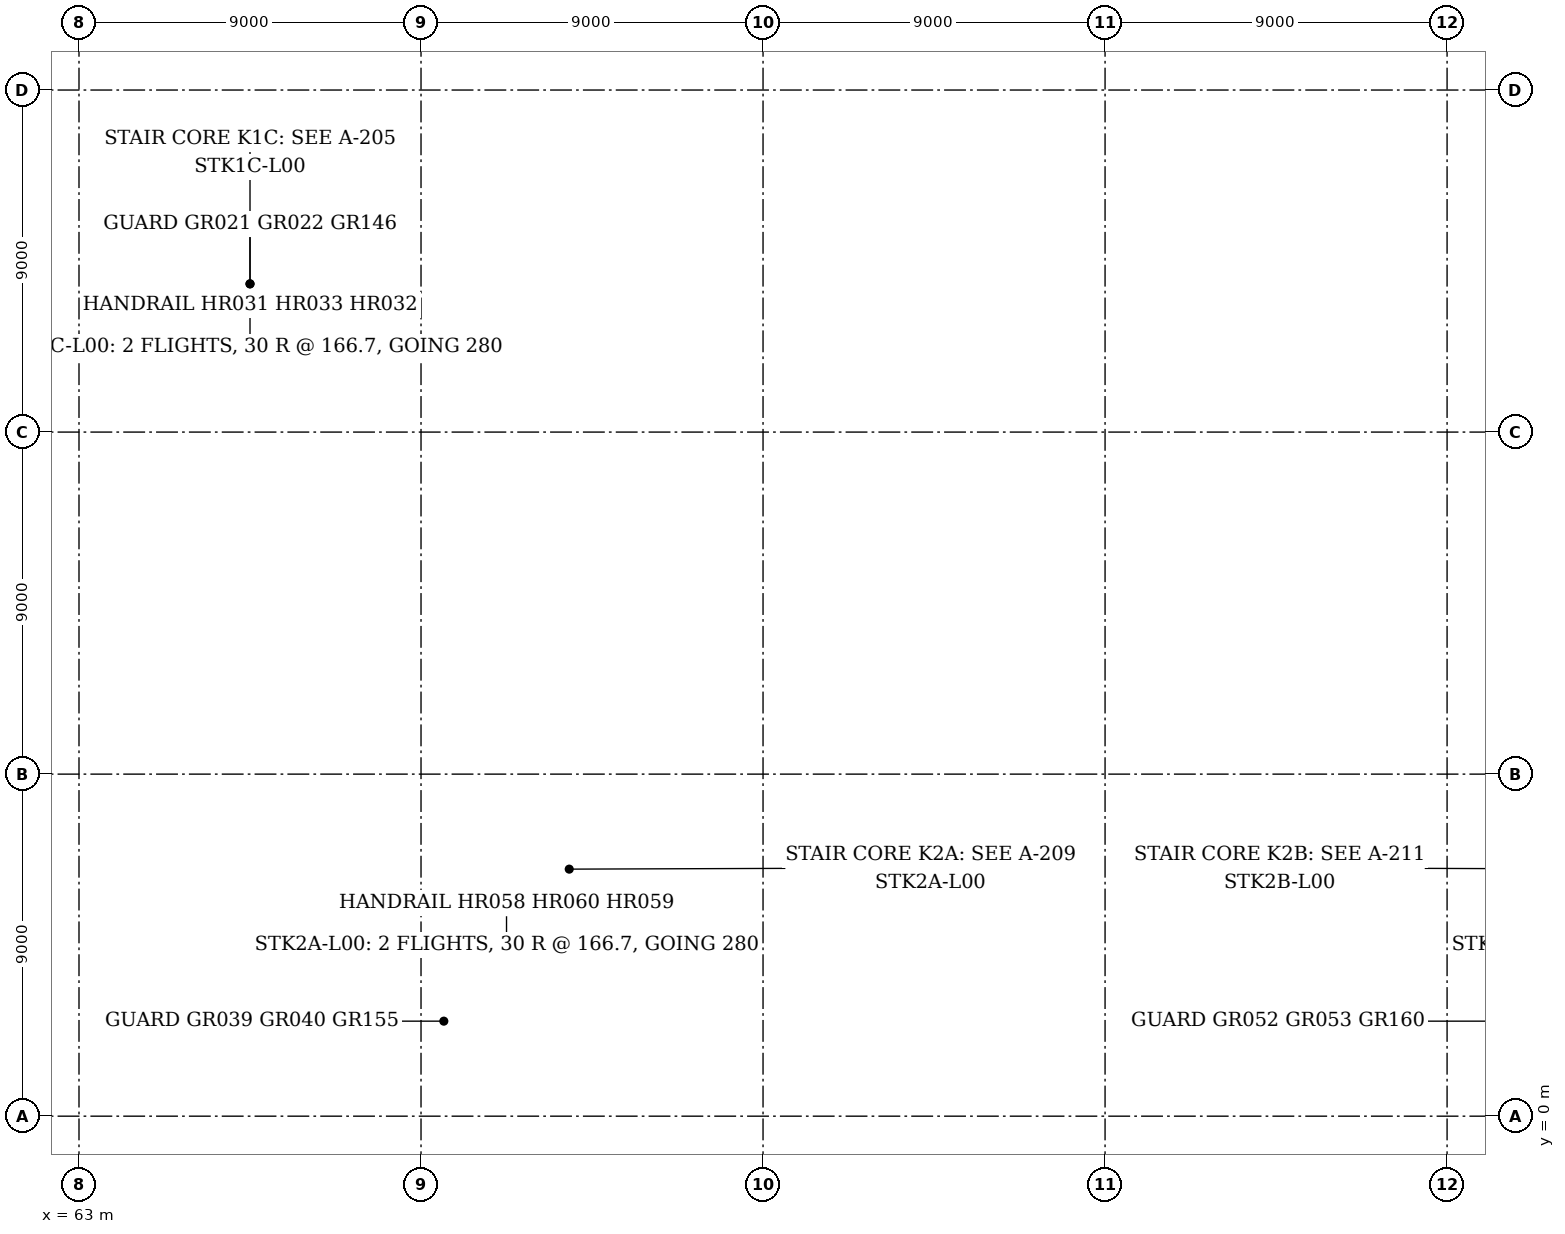
"""IFC4 building model, lengths in metres.
Left out: names, types, materials, properties, quantities, classifications, styles, units other than length and angle.
Written with IfcOpenShell. Run it as: python <this file> out.ifc"""

import sys

from ifc_helpers import new_model, si_unit, direction, frame, frame_2d, origin, origin_2d, place, context, subcontext, project, spatial, rectangle, hollow_rectangle, hollow_circle, i_section, extrude, element, fill, save


model = new_model("IFC4")
c1 = context("Model", 3, precision=1e-05, world=origin(), true_north=direction((0.0, 1.0)))
c2 = subcontext(c1, "Body", "Model", "MODEL_VIEW")
j1 = project(units=[si_unit("LENGTHUNIT", "METRE"), si_unit("PLANEANGLEUNIT", "RADIAN")], contexts=[c1])
p1 = place(None, origin())
s1 = spatial("IfcSite", under=j1, at=p1, CompositionType="ELEMENT")
p2 = place(p1, origin())
s2 = spatial("IfcBuilding", under=s1, at=p2, CompositionType="ELEMENT")
p3 = place(p2, origin())
s3 = spatial("IfcBuildingStorey", under=s2, at=p3, CompositionType="ELEMENT", Elevation=0.0)
p4 = place(p3, frame((81.0, 0.0, 0.0), z_axis=(0.0, 0.0, 1.0), x_axis=(1.0, 0.0, 0.0)))
e1 = element("IfcColumn", 1, at=p4, inside=s3, PredefinedType="COLUMN", context=c2, shape_type="SweptSolid", body=[
    extrude(hollow_rectangle(XDim=0.35, YDim=0.35, WallThickness=0.016, InnerFilletRadius=0.024, OuterFilletRadius=0.04, at=origin_2d()), origin(), (0.0, 0.0, 1.0), 5.0),
])
p5 = place(p3, frame((90.0, 0.0, 0.0), z_axis=(0.0, 0.0, 1.0), x_axis=(1.0, 0.0, 0.0)))
e2 = element("IfcColumn", 2, at=p5, inside=s3, PredefinedType="COLUMN", context=c2, shape_type="SweptSolid", body=[
    extrude(hollow_rectangle(XDim=0.3, YDim=0.3, WallThickness=0.016, InnerFilletRadius=0.024, OuterFilletRadius=0.04, at=origin_2d()), origin(), (0.0, 0.0, 1.0), 5.0),
])
p6 = place(p3, frame((99.0, 0.0, 0.0), z_axis=(0.0, 0.0, 1.0), x_axis=(1.0, 0.0, 0.0)))
e3 = element("IfcColumn", 3, at=p6, inside=s3, PredefinedType="COLUMN", context=c2, shape_type="SweptSolid", body=[
    extrude(hollow_rectangle(XDim=0.35, YDim=0.35, WallThickness=0.016, InnerFilletRadius=0.024, OuterFilletRadius=0.04, at=origin_2d()), origin(), (0.0, 0.0, 1.0), 5.0),
])
for number, where, z_axis, x_axis in (
    (4, (81.0, 9.0, 0.0), (0.0, 0.0, 1.0), (1.0, 0.0, 0.0)),
    (5, (90.0, 9.0, 0.0), (0.0, 0.0, 1.0), (1.0, 0.0, 0.0)),
    (6, (99.0, 9.0, 0.0), (0.0, 0.0, 1.0), (1.0, 0.0, 0.0)),
    (7, (81.0, 18.0, 0.0), (0.0, 0.0, 1.0), (1.0, 0.0, 0.0)),
    (8, (99.0, 18.0, 0.0), (0.0, 0.0, 1.0), (1.0, 0.0, 0.0)),
):
    element("IfcColumn", number, at=place(p3, frame(where, z_axis=z_axis, x_axis=x_axis)), inside=s3, PredefinedType="COLUMN", context=c2, shape_type="SweptSolid", body=[
        extrude(hollow_circle(Radius=0.203, WallThickness=0.013, at=origin_2d()), origin(), (0.0, 0.0, 1.0), 5.0),
    ])
p7 = place(p3, frame((63.0, 27.0, 0.0), z_axis=(0.0, 0.0, 1.0), x_axis=(1.0, 0.0, 0.0)))
e9 = element("IfcColumn", 9, at=p7, inside=s3, PredefinedType="COLUMN", context=c2, shape_type="SweptSolid", body=[
    extrude(i_section(OverallWidth=0.311, OverallDepth=0.327, WebThickness=0.016, FlangeThickness=0.025, FilletRadius=0.017, at=origin_2d()), origin(), (0.0, 0.0, 1.0), 5.0),
])
for number, where, z_axis, x_axis in (
    (10, (81.0, 27.0, 0.0), (0.0, 0.0, 1.0), (1.0, 0.0, 0.0)),
    (11, (90.0, 27.0, 0.0), (0.0, 0.0, 1.0), (1.0, 0.0, 0.0)),
    (12, (99.0, 27.0, 0.0), (0.0, 0.0, 1.0), (1.0, 0.0, 0.0)),
):
    element("IfcColumn", number, at=place(p3, frame(where, z_axis=z_axis, x_axis=x_axis)), inside=s3, PredefinedType="COLUMN", context=c2, shape_type="SweptSolid", body=[
        extrude(hollow_circle(Radius=0.203, WallThickness=0.013, at=origin_2d()), origin(), (0.0, 0.0, 1.0), 5.0),
    ])
p8 = place(p3, frame((67.5, 13.5, -0.2), z_axis=(0.0, 0.0, 1.0), x_axis=(1.0, 0.0, 0.0)))
e13 = element("IfcColumn", 13, at=p8, inside=s3, PredefinedType="COLUMN", context=c2, shape_type="SweptSolid", body=[
    extrude(hollow_circle(Radius=0.11, WallThickness=0.008, at=origin_2d()), origin(), (0.0, 0.0, 1.0), 4.743),
])
p9 = place(p3, frame((72.1, 9.0, 0.0), z_axis=(0.0, 0.0, 1.0), x_axis=(0.0, 1.0, 0.0)))
e14 = element("IfcWall", 14, at=p9, inside=s3, PredefinedType="SOLIDWALL", context=c2, shape_type="SweptSolid", body=[
    extrude(rectangle(XDim=9.0, YDim=0.32, at=frame_2d((4.5, 0.0))), origin(), (0.0, 0.0, 1.0), 4.835),
])
p10 = place(p3, frame((82.663, 0.15, 0.0), z_axis=(0.0, 0.0, 1.0), x_axis=(1.0, 0.0, 0.0)))
e15 = element("IfcWall", 15, at=p10, inside=s3, PredefinedType="SOLIDWALL", context=c2, shape_type="SweptSolid", body=[
    extrude(rectangle(XDim=5.7, YDim=0.2, at=frame_2d((2.85, 0.0))), origin(), (0.0, 0.0, 1.0), 4.835),
])
p11 = place(p10, frame((0.3, 0.0, 0.0)))
e16 = element("IfcOpeningElement", 16, at=p11, cuts=e15, PredefinedType="OPENING", context=c2, shape_type="SweptSolid", body=[
    extrude(rectangle(XDim=2.4, YDim=2.4, at=frame_2d((1.2, 1.2))), frame((0.0, 0.11, 0.0), z_axis=(0.0, -1.0, 0.0), x_axis=(1.0, 0.0, 0.0)), (0.0, 0.0, 1.0), 0.22),
])
p12 = place(p10, frame((3.0, 0.0, 0.0)))
e17 = element("IfcOpeningElement", 17, at=p12, cuts=e15, PredefinedType="OPENING", context=c2, shape_type="SweptSolid", body=[
    extrude(rectangle(XDim=2.4, YDim=2.4, at=frame_2d((1.2, 1.2))), frame((0.0, 0.11, 0.0), z_axis=(0.0, -1.0, 0.0), x_axis=(1.0, 0.0, 0.0)), (0.0, 0.0, 1.0), 0.22),
])
p13 = place(p3, frame((63.0, 18.15, 0.0), z_axis=(0.0, 0.0, 1.0), x_axis=(1.0, 0.0, 0.0)))
e18 = element("IfcWall", 18, at=p13, inside=s3, PredefinedType="SOLIDWALL", context=c2, shape_type="SweptSolid", body=[
    extrude(rectangle(XDim=9.0, YDim=0.3, at=frame_2d((4.5, 0.0))), origin(), (0.0, 0.0, 1.0), 5.0),
])
p14 = place(p13, frame((3.65, 0.0, 0.0)))
e19 = element("IfcOpeningElement", 19, at=p14, cuts=e18, PredefinedType="OPENING", context=c2, shape_type="SweptSolid", body=[
    extrude(rectangle(XDim=1.8, YDim=2.1, at=frame_2d((0.9, 1.05))), frame((0.0, 0.16, 0.0), z_axis=(0.0, -1.0, 0.0), x_axis=(1.0, 0.0, 0.0)), (0.0, 0.0, 1.0), 0.32),
])
p15 = place(p3, frame((71.85, 18.3, 0.0), z_axis=(0.0, 0.0, 1.0), x_axis=(0.0, 1.0, 0.0)))
e20 = element("IfcWall", 20, at=p15, inside=s3, PredefinedType="SOLIDWALL", context=c2, shape_type="SweptSolid", body=[
    extrude(rectangle(XDim=3.9, YDim=0.3, at=frame_2d((1.95, 0.0))), origin(), (0.0, 0.0, 1.0), 5.0),
])
p16 = place(p3, frame((63.0, 22.35, 0.0), z_axis=(0.0, 0.0, 1.0), x_axis=(1.0, 0.0, 0.0)))
e21 = element("IfcWall", 21, at=p16, inside=s3, PredefinedType="SOLIDWALL", context=c2, shape_type="SweptSolid", body=[
    extrude(rectangle(XDim=9.0, YDim=0.3, at=frame_2d((4.5, 0.0))), origin(), (0.0, 0.0, 1.0), 5.0),
])
p17 = place(p3, frame((63.15, 18.3, 0.0), z_axis=(0.0, 0.0, 1.0), x_axis=(0.0, 1.0, 0.0)))
e22 = element("IfcWall", 22, at=p17, inside=s3, PredefinedType="SOLIDWALL", context=c2, shape_type="SweptSolid", body=[
    extrude(rectangle(XDim=3.9, YDim=0.3, at=frame_2d((1.95, 0.0))), origin(), (0.0, 0.0, 1.0), 5.0),
])
p18 = place(p17, frame((1.05, 0.0, 0.0)))
e23 = element("IfcOpeningElement", 23, at=p18, cuts=e22, PredefinedType="OPENING", context=c2, shape_type="SweptSolid", body=[
    extrude(rectangle(XDim=1.8, YDim=2.1, at=frame_2d((0.9, 1.05))), frame((0.0, 0.16, 0.0), z_axis=(0.0, -1.0, 0.0), x_axis=(1.0, 0.0, 0.0)), (0.0, 0.0, 1.0), 0.32),
])
p19 = place(p3, frame((72.0, 0.15, 0.0), z_axis=(0.0, 0.0, 1.0), x_axis=(1.0, 0.0, 0.0)))
e24 = element("IfcWall", 24, at=p19, inside=s3, PredefinedType="SOLIDWALL", context=c2, shape_type="SweptSolid", body=[
    extrude(rectangle(XDim=4.5, YDim=0.3, at=frame_2d((2.25, 0.0))), origin(), (0.0, 0.0, 1.0), 5.0),
])
p20 = place(p19, frame((1.35, 0.0, 0.0)))
e25 = element("IfcOpeningElement", 25, at=p20, cuts=e24, PredefinedType="OPENING", context=c2, shape_type="SweptSolid", body=[
    extrude(rectangle(XDim=1.8, YDim=2.1, at=frame_2d((0.9, 1.05))), frame((0.0, 0.16, 0.0), z_axis=(0.0, -1.0, 0.0), x_axis=(1.0, 0.0, 0.0)), (0.0, 0.0, 1.0), 0.32),
])
p21 = place(p3, frame((76.35, 0.3, 0.0), z_axis=(0.0, 0.0, 1.0), x_axis=(0.0, 1.0, 0.0)))
e26 = element("IfcWall", 26, at=p21, inside=s3, PredefinedType="SOLIDWALL", context=c2, shape_type="SweptSolid", body=[
    extrude(rectangle(XDim=8.4, YDim=0.3, at=frame_2d((4.2, 0.0))), origin(), (0.0, 0.0, 1.0), 5.0),
])
p22 = place(p21, frame((0.25, 0.0, 0.0)))
e27 = element("IfcOpeningElement", 27, at=p22, cuts=e26, PredefinedType="OPENING", context=c2, shape_type="SweptSolid", body=[
    extrude(rectangle(XDim=1.2, YDim=2.1, at=frame_2d((0.6, 1.05))), frame((0.0, 0.16, 0.0), z_axis=(0.0, -1.0, 0.0), x_axis=(1.0, 0.0, 0.0)), (0.0, 0.0, 1.0), 0.32),
])
p23 = place(p3, frame((72.0, 8.85, 0.0), z_axis=(0.0, 0.0, 1.0), x_axis=(1.0, 0.0, 0.0)))
e28 = element("IfcWall", 28, at=p23, inside=s3, PredefinedType="SOLIDWALL", context=c2, shape_type="SweptSolid", body=[
    extrude(rectangle(XDim=4.5, YDim=0.3, at=frame_2d((2.25, 0.0))), origin(), (0.0, 0.0, 1.0), 5.0),
])
p24 = place(p3, frame((72.15, 0.3, 0.0), z_axis=(0.0, 0.0, 1.0), x_axis=(0.0, 1.0, 0.0)))
e29 = element("IfcWall", 29, at=p24, inside=s3, PredefinedType="SOLIDWALL", context=c2, shape_type="SweptSolid", body=[
    extrude(rectangle(XDim=8.4, YDim=0.3, at=frame_2d((4.2, 0.0))), origin(), (0.0, 0.0, 1.0), 5.0),
])
p25 = place(p3, frame((72.0, 27.15, 0.0), z_axis=(0.0, 0.0, 1.0), x_axis=(1.0, 0.0, 0.0)))
e30 = element("IfcWall", 30, at=p25, inside=s3, PredefinedType="SOLIDWALL", context=c2, shape_type="SweptSolid", body=[
    extrude(rectangle(XDim=4.5, YDim=0.3, at=frame_2d((2.25, 0.0))), origin(), (0.0, 0.0, 1.0), 5.0),
])
p26 = place(p3, frame((76.35, 27.3, 0.0), z_axis=(0.0, 0.0, 1.0), x_axis=(0.0, 1.0, 0.0)))
e31 = element("IfcWall", 31, at=p26, inside=s3, PredefinedType="SOLIDWALL", context=c2, shape_type="SweptSolid", body=[
    extrude(rectangle(XDim=8.4, YDim=0.3, at=frame_2d((4.2, 0.0))), origin(), (0.0, 0.0, 1.0), 5.0),
])
p27 = place(p26, frame((0.45, 0.0, 0.0)))
e32 = element("IfcOpeningElement", 32, at=p27, cuts=e31, PredefinedType="OPENING", context=c2, shape_type="SweptSolid", body=[
    extrude(rectangle(XDim=1.4, YDim=2.1, at=frame_2d((0.7, 1.05))), frame((0.0, 0.16, 0.0), z_axis=(0.0, -1.0, 0.0), x_axis=(1.0, 0.0, 0.0)), (0.0, 0.0, 1.0), 0.32),
])
p28 = place(p26, frame((4.925, 0.0, 0.0)))
e33 = element("IfcOpeningElement", 33, at=p28, cuts=e31, PredefinedType="OPENING", context=c2, shape_type="SweptSolid", body=[
    extrude(rectangle(XDim=1.0, YDim=2.1, at=frame_2d((0.5, 1.05))), frame((0.0, 0.16, 0.0), z_axis=(0.0, -1.0, 0.0), x_axis=(1.0, 0.0, 0.0)), (0.0, 0.0, 1.0), 0.32),
])
p29 = place(p3, frame((72.15, 27.3, 0.0), z_axis=(0.0, 0.0, 1.0), x_axis=(0.0, 1.0, 0.0)))
e34 = element("IfcWall", 34, at=p29, inside=s3, PredefinedType="SOLIDWALL", context=c2, shape_type="SweptSolid", body=[
    extrude(rectangle(XDim=8.4, YDim=0.3, at=frame_2d((4.2, 0.0))), origin(), (0.0, 0.0, 1.0), 5.0),
])
p30 = place(p29, frame((0.45, 0.0, 0.0)))
e35 = element("IfcOpeningElement", 35, at=p30, cuts=e34, PredefinedType="OPENING", context=c2, shape_type="SweptSolid", body=[
    extrude(rectangle(XDim=1.4, YDim=2.1, at=frame_2d((0.7, 1.05))), frame((0.0, 0.16, 0.0), z_axis=(0.0, -1.0, 0.0), x_axis=(1.0, 0.0, 0.0)), (0.0, 0.0, 1.0), 0.32),
])
for number, where, z_axis, x_axis in (
    (36, (84.0, 9.0, 0.0), (0.0, 0.0, 1.0), (1.0, 0.0, 0.0)),
    (37, (93.0, 9.0, 0.0), (0.0, 0.0, 1.0), (1.0, 0.0, 0.0)),
):
    element("IfcWall", number, at=place(p3, frame(where, z_axis=z_axis, x_axis=x_axis)), inside=s3, PredefinedType="PARTITIONING", context=c2, shape_type="SweptSolid", body=[
        extrude(rectangle(XDim=3.0, YDim=0.125, at=frame_2d((1.5, 0.0))), origin(), (0.0, 0.0, 1.0), 4.228),
    ])
p31 = place(p3, frame((93.0, 27.0, 0.0), z_axis=(0.0, 0.0, 1.0), x_axis=(1.0, 0.0, 0.0)))
e38 = element("IfcWall", 38, at=p31, inside=s3, PredefinedType="PARTITIONING", context=c2, shape_type="SweptSolid", body=[
    extrude(rectangle(XDim=3.0, YDim=0.15, at=frame_2d((1.5, 0.0))), origin(), (0.0, 0.0, 1.0), 4.228),
])
p32 = place(p31, frame((0.95, 0.0, 0.0)))
e39 = element("IfcOpeningElement", 39, at=p32, cuts=e38, PredefinedType="OPENING", context=c2, shape_type="SweptSolid", body=[
    extrude(rectangle(XDim=1.0, YDim=2.1, at=frame_2d((0.5, 1.05))), frame((0.0, 0.085, 0.0), z_axis=(0.0, -1.0, 0.0), x_axis=(1.0, 0.0, 0.0)), (0.0, 0.0, 1.0), 0.17),
])
p33 = place(p3, frame((81.203, 27.0, 0.0), z_axis=(0.0, 0.0, 1.0), x_axis=(1.0, 0.0, 0.0)))
e40 = element("IfcWall", 40, at=p33, inside=s3, PredefinedType="PARTITIONING", context=c2, shape_type="SweptSolid", body=[
    extrude(rectangle(XDim=8.594, YDim=0.125, at=frame_2d((4.297, 0.0))), origin(), (0.0, 0.0, 1.0), 4.228),
])
p34 = place(p33, frame((3.75, 0.0, 0.0)))
e41 = element("IfcOpeningElement", 41, at=p34, cuts=e40, PredefinedType="OPENING", context=c2, shape_type="SweptSolid", body=[
    extrude(rectangle(XDim=1.0, YDim=2.1, at=frame_2d((0.5, 1.05))), frame((0.0, 0.073, 0.0), z_axis=(0.0, -1.0, 0.0), x_axis=(1.0, 0.0, 0.0)), (0.0, 0.0, 1.0), 0.145),
])
p35 = place(p3, frame((99.203, 9.0, 0.0), z_axis=(0.0, 0.0, 1.0), x_axis=(1.0, 0.0, 0.0)))
e42 = element("IfcWall", 42, at=p35, inside=s3, PredefinedType="PARTITIONING", context=c2, shape_type="SweptSolid", body=[
    extrude(rectangle(XDim=4.297, YDim=0.2, at=frame_2d((2.148, 0.0))), origin(), (0.0, 0.0, 1.0), 4.302),
])
p36 = place(p35, frame((1.25, 0.0, 0.0)))
e43 = element("IfcOpeningElement", 43, at=p36, cuts=e42, PredefinedType="OPENING", context=c2, shape_type="SweptSolid", body=[
    extrude(rectangle(XDim=1.8, YDim=2.1, at=frame_2d((0.9, 1.05))), frame((0.0, 0.11, 0.0), z_axis=(0.0, -1.0, 0.0), x_axis=(1.0, 0.0, 0.0)), (0.0, 0.0, 1.0), 0.22),
])
p37 = place(p3, frame((81.0, 0.175, 0.0), z_axis=(0.0, 0.0, 1.0), x_axis=(0.0, 1.0, 0.0)))
e44 = element("IfcWall", 44, at=p37, inside=s3, PredefinedType="PARTITIONING", context=c2, shape_type="SweptSolid", body=[
    extrude(rectangle(XDim=8.622, YDim=0.125, at=frame_2d((4.311, 0.0))), origin(), (0.0, 0.0, 1.0), 4.302),
])
p38 = place(p37, frame((2.05, 0.0, 0.0)))
e45 = element("IfcOpeningElement", 45, at=p38, cuts=e44, PredefinedType="OPENING", context=c2, shape_type="SweptSolid", body=[
    extrude(rectangle(XDim=1.0, YDim=2.1, at=frame_2d((0.5, 1.05))), frame((0.0, 0.073, 0.0), z_axis=(0.0, -1.0, 0.0), x_axis=(1.0, 0.0, 0.0)), (0.0, 0.0, 1.0), 0.145),
])
p39 = place(p3, frame((99.0, 0.175, 0.0), z_axis=(0.0, 0.0, 1.0), x_axis=(0.0, 1.0, 0.0)))
e46 = element("IfcWall", 46, at=p39, inside=s3, PredefinedType="PARTITIONING", context=c2, shape_type="SweptSolid", body=[
    extrude(rectangle(XDim=8.622, YDim=0.2, at=frame_2d((4.311, 0.0))), origin(), (0.0, 0.0, 1.0), 4.302),
])
for number, where, z_axis, x_axis in (
    (47, (81.0, 27.203, 0.0), (0.0, 0.0, 1.0), (0.0, 1.0, 0.0)),
    (48, (90.0, 27.203, 0.0), (0.0, 0.0, 1.0), (0.0, 1.0, 0.0)),
):
    element("IfcWall", number, at=place(p3, frame(where, z_axis=z_axis, x_axis=x_axis)), inside=s3, PredefinedType="PARTITIONING", context=c2, shape_type="SweptSolid", body=[
        extrude(rectangle(XDim=1.597, YDim=0.125, at=frame_2d((0.798, 0.0))), origin(), (0.0, 0.0, 1.0), 4.302),
    ])
p40 = place(p11, frame((2.4, 0.0, 0.0), z_axis=(0.0, 0.0, 1.0), x_axis=(-1.0, 0.0, 0.0)))
e49 = element("IfcDoor", 49, at=p40, inside=s3, OperationType="DOUBLE_DOOR_SINGLE_SWING", PredefinedType="DOOR", context=c2, shape_type="SweptSolid", body=[
    extrude(rectangle(XDim=2.4, YDim=2.4, at=frame_2d((1.2, 1.2))), frame((0.0, 0.025, 0.0), z_axis=(0.0, -1.0, 0.0), x_axis=(1.0, 0.0, 0.0)), (0.0, 0.0, 1.0), 0.05),
])
fill(e16, e49)
p41 = place(p12, frame((2.4, 0.0, 0.0), z_axis=(0.0, 0.0, 1.0), x_axis=(-1.0, 0.0, 0.0)))
e50 = element("IfcDoor", 50, at=p41, inside=s3, OperationType="DOUBLE_DOOR_SINGLE_SWING", PredefinedType="DOOR", context=c2, shape_type="SweptSolid", body=[
    extrude(rectangle(XDim=2.4, YDim=2.4, at=frame_2d((1.2, 1.2))), frame((0.0, 0.025, 0.0), z_axis=(0.0, -1.0, 0.0), x_axis=(1.0, 0.0, 0.0)), (0.0, 0.0, 1.0), 0.05),
])
fill(e17, e50)
p42 = place(p14, frame((1.8, 0.0, 0.0), z_axis=(0.0, 0.0, 1.0), x_axis=(-1.0, 0.0, 0.0)))
e51 = element("IfcDoor", 51, at=p42, inside=s3, OperationType="DOUBLE_DOOR_SINGLE_SWING", PredefinedType="DOOR", context=c2, shape_type="SweptSolid", body=[
    extrude(rectangle(XDim=1.8, YDim=2.1, at=frame_2d((0.9, 1.05))), frame((0.0, 0.025, 0.0), z_axis=(0.0, -1.0, 0.0), x_axis=(1.0, 0.0, 0.0)), (0.0, 0.0, 1.0), 0.05),
])
fill(e19, e51)
p43 = place(p18, frame((1.8, 0.0, 0.0), z_axis=(0.0, 0.0, 1.0), x_axis=(-1.0, 0.0, 0.0)))
e52 = element("IfcDoor", 52, at=p43, inside=s3, OperationType="DOUBLE_DOOR_SINGLE_SWING", PredefinedType="DOOR", context=c2, shape_type="SweptSolid", body=[
    extrude(rectangle(XDim=1.8, YDim=2.1, at=frame_2d((0.9, 1.05))), frame((0.0, 0.025, 0.0), z_axis=(0.0, -1.0, 0.0), x_axis=(1.0, 0.0, 0.0)), (0.0, 0.0, 1.0), 0.05),
])
fill(e23, e52)
p44 = place(p20, frame((1.8, 0.0, 0.0), z_axis=(0.0, 0.0, 1.0), x_axis=(-1.0, 0.0, 0.0)))
e53 = element("IfcDoor", 53, at=p44, inside=s3, OperationType="DOUBLE_DOOR_SINGLE_SWING", PredefinedType="DOOR", context=c2, shape_type="SweptSolid", body=[
    extrude(rectangle(XDim=1.8, YDim=2.1, at=frame_2d((0.9, 1.05))), frame((0.0, 0.025, 0.0), z_axis=(0.0, -1.0, 0.0), x_axis=(1.0, 0.0, 0.0)), (0.0, 0.0, 1.0), 0.05),
])
fill(e25, e53)
p45 = place(p22, origin())
e54 = element("IfcDoor", 54, at=p45, inside=s3, OperationType="SINGLE_SWING_RIGHT", PredefinedType="DOOR", context=c2, shape_type="SweptSolid", body=[
    extrude(rectangle(XDim=1.2, YDim=2.1, at=frame_2d((0.6, 1.05))), frame((0.0, 0.025, 0.0), z_axis=(0.0, -1.0, 0.0), x_axis=(1.0, 0.0, 0.0)), (0.0, 0.0, 1.0), 0.05),
])
fill(e27, e54)
p46 = place(p27, origin())
e55 = element("IfcDoor", 55, at=p46, inside=s3, OperationType="SLIDING_TO_LEFT", PredefinedType="DOOR", context=c2, shape_type="SweptSolid", body=[
    extrude(rectangle(XDim=1.4, YDim=2.1, at=frame_2d((0.7, 1.05))), frame((0.0, 0.025, 0.0), z_axis=(0.0, -1.0, 0.0), x_axis=(1.0, 0.0, 0.0)), (0.0, 0.0, 1.0), 0.05),
])
fill(e32, e55)
p47 = place(p30, origin())
e56 = element("IfcDoor", 56, at=p47, inside=s3, OperationType="SLIDING_TO_RIGHT", PredefinedType="DOOR", context=c2, shape_type="SweptSolid", body=[
    extrude(rectangle(XDim=1.4, YDim=2.1, at=frame_2d((0.7, 1.05))), frame((0.0, 0.025, 0.0), z_axis=(0.0, -1.0, 0.0), x_axis=(1.0, 0.0, 0.0)), (0.0, 0.0, 1.0), 0.05),
])
fill(e35, e56)
p48 = place(p38, frame((1.0, 0.0, 0.0), z_axis=(0.0, 0.0, 1.0), x_axis=(-1.0, 0.0, 0.0)))
e57 = element("IfcDoor", 57, at=p48, inside=s3, OperationType="SINGLE_SWING_LEFT", PredefinedType="DOOR", context=c2, shape_type="SweptSolid", body=[
    extrude(rectangle(XDim=1.0, YDim=2.1, at=frame_2d((0.5, 1.05))), frame((0.0, 0.025, 0.0), z_axis=(0.0, -1.0, 0.0), x_axis=(1.0, 0.0, 0.0)), (0.0, 0.0, 1.0), 0.05),
])
fill(e45, e57)
p49 = place(p32, origin())
e58 = element("IfcDoor", 58, at=p49, inside=s3, OperationType="SINGLE_SWING_LEFT", PredefinedType="DOOR", context=c2, shape_type="SweptSolid", body=[
    extrude(rectangle(XDim=1.0, YDim=2.1, at=frame_2d((0.5, 1.05))), frame((0.0, 0.025, 0.0), z_axis=(0.0, -1.0, 0.0), x_axis=(1.0, 0.0, 0.0)), (0.0, 0.0, 1.0), 0.05),
])
fill(e39, e58)
p50 = place(p34, origin())
e59 = element("IfcDoor", 59, at=p50, inside=s3, OperationType="SINGLE_SWING_RIGHT", PredefinedType="DOOR", context=c2, shape_type="SweptSolid", body=[
    extrude(rectangle(XDim=1.0, YDim=2.1, at=frame_2d((0.5, 1.05))), frame((0.0, 0.025, 0.0), z_axis=(0.0, -1.0, 0.0), x_axis=(1.0, 0.0, 0.0)), (0.0, 0.0, 1.0), 0.05),
])
fill(e41, e59)
save(model, sys.argv[1])
